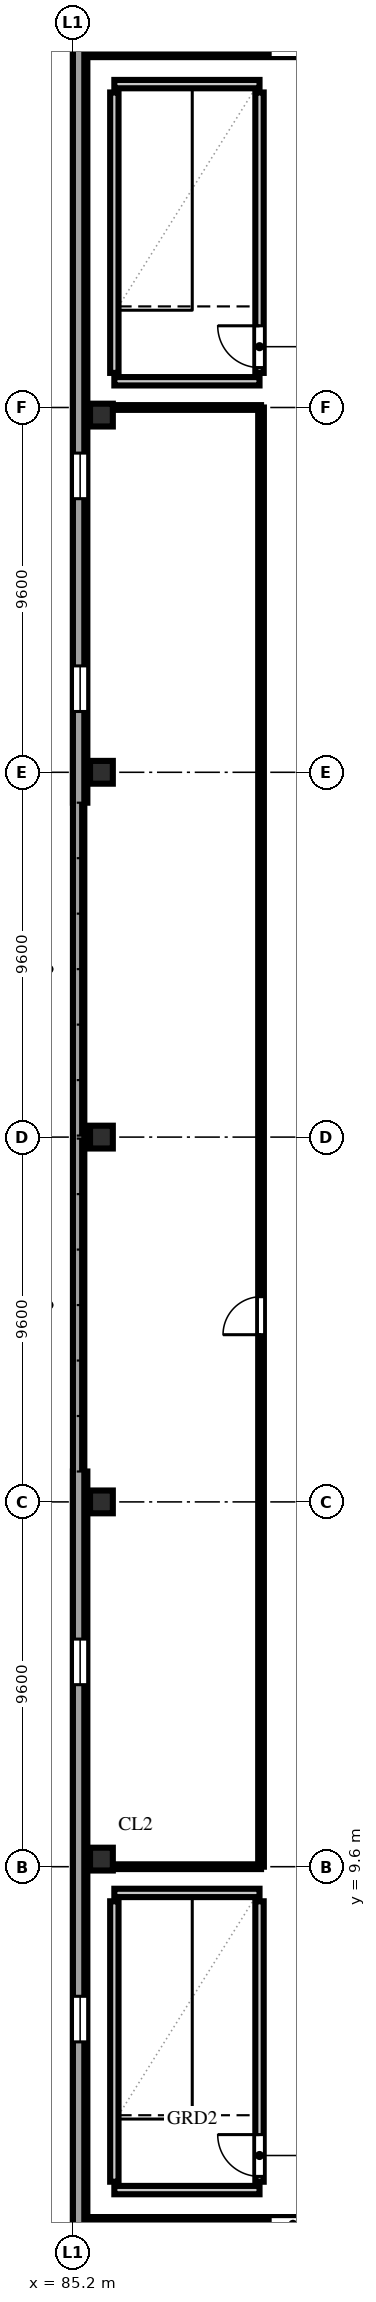
"""IFC4 building model, lengths in metres.
Left out: names, types, materials, properties, quantities, classifications, styles, units other than length and angle.
Written with IfcOpenShell. Run it as: python <this file> out.ifc"""

import sys

from ifc_helpers import new_model, si_unit, direction, frame, frame_2d, origin, origin_2d, place, context, subcontext, project, spatial, rectangle, extrude, element, fill, save


model = new_model("IFC4")
c1 = context("Model", 3, precision=1e-05, world=origin(), true_north=direction((0.0, 1.0)))
c2 = subcontext(c1, "Body", "Model", "MODEL_VIEW")
j1 = project(units=[si_unit("LENGTHUNIT", "METRE"), si_unit("PLANEANGLEUNIT", "RADIAN")], contexts=[c1])
p1 = place(None, origin())
s1 = spatial("IfcSite", under=j1, at=p1, CompositionType="ELEMENT")
p2 = place(p1, origin())
s2 = spatial("IfcBuilding", under=s1, at=p2, CompositionType="ELEMENT")
p3 = place(p2, frame((0.0, 0.0, 19.6)))
s3 = spatial("IfcBuildingStorey", under=s2, at=p3, CompositionType="ELEMENT", Elevation=19.6)
for number, where, z_axis, x_axis in (
    (1, (85.95, 9.8, 0.0), (0.0, 0.0, 1.0), (1.0, 0.0, 0.0)),
    (2, (85.95, 19.2, 0.0), (0.0, 0.0, 1.0), (1.0, 0.0, 0.0)),
    (3, (85.95, 28.8, 0.0), (0.0, 0.0, 1.0), (1.0, 0.0, 0.0)),
    (4, (85.95, 38.4, 0.0), (0.0, 0.0, 1.0), (1.0, 0.0, 0.0)),
    (5, (85.95, 47.8, 0.0), (0.0, 0.0, 1.0), (1.0, 0.0, 0.0)),
):
    element("IfcColumn", number, at=place(p3, frame(where, z_axis=z_axis, x_axis=x_axis)), inside=s3, PredefinedType="COLUMN", context=c2, shape_type="SweptSolid", body=[
        extrude(rectangle(XDim=0.6, YDim=0.6, at=origin_2d()), origin(), (0.0, 0.0, 1.0), 4.32),
    ])
p4 = place(p3, frame((85.39, 0.19, 0.0), z_axis=(0.0, 0.0, 1.0), x_axis=(1.0, 0.0, 0.0)))
e6 = element("IfcWall", 6, at=p4, inside=s3, PredefinedType="SOLIDWALL", context=c2, shape_type="SweptSolid", body=[
    extrude(rectangle(XDim=41.62, YDim=0.38, at=frame_2d((20.81, 0.0))), origin(), (0.0, 0.0, 1.0), 4.32),
])
p5 = place(p4, frame((5.0, 0.0, 1.25)))
e7 = element("IfcOpeningElement", 7, at=p5, cuts=e6, PredefinedType="OPENING", context=c2, shape_type="SweptSolid", body=[
    extrude(rectangle(XDim=1.2, YDim=1.65, at=frame_2d((0.6, 0.825))), frame((0.0, 0.202, 0.0), z_axis=(0.0, -1.0, 0.0), x_axis=(1.0, 0.0, 0.0)), (0.0, 0.0, 1.0), 0.404),
])
p6 = place(p4, frame((11.8, 0.0, 1.25)))
e8 = element("IfcOpeningElement", 8, at=p6, cuts=e6, PredefinedType="OPENING", context=c2, shape_type="SweptSolid", body=[
    extrude(rectangle(XDim=1.2, YDim=1.65, at=frame_2d((0.6, 0.825))), frame((0.0, 0.202, 0.0), z_axis=(0.0, -1.0, 0.0), x_axis=(1.0, 0.0, 0.0)), (0.0, 0.0, 1.0), 0.404),
])
p7 = place(p4, frame((20.2, 0.0, 1.25)))
e9 = element("IfcOpeningElement", 9, at=p7, cuts=e6, PredefinedType="OPENING", context=c2, shape_type="SweptSolid", body=[
    extrude(rectangle(XDim=1.2, YDim=1.65, at=frame_2d((0.6, 0.825))), frame((0.0, 0.202, 0.0), z_axis=(0.0, -1.0, 0.0), x_axis=(1.0, 0.0, 0.0)), (0.0, 0.0, 1.0), 0.404),
])
p8 = place(p4, frame((26.8, 0.0, 1.25)))
e10 = element("IfcOpeningElement", 10, at=p8, cuts=e6, PredefinedType="OPENING", context=c2, shape_type="SweptSolid", body=[
    extrude(rectangle(XDim=1.2, YDim=1.65, at=frame_2d((0.6, 0.825))), frame((0.0, 0.202, 0.0), z_axis=(0.0, -1.0, 0.0), x_axis=(1.0, 0.0, 0.0)), (0.0, 0.0, 1.0), 0.404),
])
p9 = place(p4, frame((36.8, 0.0, 1.25)))
e11 = element("IfcOpeningElement", 11, at=p9, cuts=e6, PredefinedType="OPENING", context=c2, shape_type="SweptSolid", body=[
    extrude(rectangle(XDim=1.2, YDim=1.65, at=frame_2d((0.6, 0.825))), frame((0.0, 0.202, 0.0), z_axis=(0.0, -1.0, 0.0), x_axis=(1.0, 0.0, 0.0)), (0.0, 0.0, 1.0), 0.404),
])
p10 = place(p3, frame((85.39, 57.41, 0.0), z_axis=(0.0, 0.0, 1.0), x_axis=(1.0, 0.0, 0.0)))
e12 = element("IfcWall", 12, at=p10, inside=s3, PredefinedType="SOLIDWALL", context=c2, shape_type="SweptSolid", body=[
    extrude(rectangle(XDim=41.62, YDim=0.38, at=frame_2d((20.81, 0.0))), origin(), (0.0, 0.0, 1.0), 4.32),
])
p11 = place(p10, frame((5.0, 0.0, 1.25)))
e13 = element("IfcOpeningElement", 13, at=p11, cuts=e12, PredefinedType="OPENING", context=c2, shape_type="SweptSolid", body=[
    extrude(rectangle(XDim=1.2, YDim=1.65, at=frame_2d((0.6, 0.825))), frame((0.0, 0.202, 0.0), z_axis=(0.0, -1.0, 0.0), x_axis=(1.0, 0.0, 0.0)), (0.0, 0.0, 1.0), 0.404),
])
p12 = place(p10, frame((11.8, 0.0, 1.25)))
e14 = element("IfcOpeningElement", 14, at=p12, cuts=e12, PredefinedType="OPENING", context=c2, shape_type="SweptSolid", body=[
    extrude(rectangle(XDim=1.2, YDim=1.65, at=frame_2d((0.6, 0.825))), frame((0.0, 0.202, 0.0), z_axis=(0.0, -1.0, 0.0), x_axis=(1.0, 0.0, 0.0)), (0.0, 0.0, 1.0), 0.404),
])
p13 = place(p10, frame((20.2, 0.0, 1.25)))
e15 = element("IfcOpeningElement", 15, at=p13, cuts=e12, PredefinedType="OPENING", context=c2, shape_type="SweptSolid", body=[
    extrude(rectangle(XDim=1.2, YDim=1.65, at=frame_2d((0.6, 0.825))), frame((0.0, 0.202, 0.0), z_axis=(0.0, -1.0, 0.0), x_axis=(1.0, 0.0, 0.0)), (0.0, 0.0, 1.0), 0.404),
])
p14 = place(p10, frame((26.8, 0.0, 1.25)))
e16 = element("IfcOpeningElement", 16, at=p14, cuts=e12, PredefinedType="OPENING", context=c2, shape_type="SweptSolid", body=[
    extrude(rectangle(XDim=1.2, YDim=1.65, at=frame_2d((0.6, 0.825))), frame((0.0, 0.202, 0.0), z_axis=(0.0, -1.0, 0.0), x_axis=(1.0, 0.0, 0.0)), (0.0, 0.0, 1.0), 0.404),
])
p15 = place(p10, frame((36.8, 0.0, 1.25)))
e17 = element("IfcOpeningElement", 17, at=p15, cuts=e12, PredefinedType="OPENING", context=c2, shape_type="SweptSolid", body=[
    extrude(rectangle(XDim=1.2, YDim=1.65, at=frame_2d((0.6, 0.825))), frame((0.0, 0.202, 0.0), z_axis=(0.0, -1.0, 0.0), x_axis=(1.0, 0.0, 0.0)), (0.0, 0.0, 1.0), 0.404),
])
p16 = place(p3, frame((85.39, 0.19, 0.0), z_axis=(0.0, 0.0, 1.0), x_axis=(0.0, 1.0, 0.0)))
e18 = element("IfcWall", 18, at=p16, inside=s3, PredefinedType="SOLIDWALL", context=c2, shape_type="SweptSolid", body=[
    extrude(rectangle(XDim=19.81, YDim=0.38, at=frame_2d((9.905, 0.0))), origin(), (0.0, 0.0, 1.0), 4.32),
])
p17 = place(p16, frame((4.8, 0.0, 1.25)))
e19 = element("IfcOpeningElement", 19, at=p17, cuts=e18, PredefinedType="OPENING", context=c2, shape_type="SweptSolid", body=[
    extrude(rectangle(XDim=1.2, YDim=1.65, at=frame_2d((0.6, 0.825))), frame((0.0, 0.202, 0.0), z_axis=(0.0, -1.0, 0.0), x_axis=(1.0, 0.0, 0.0)), (0.0, 0.0, 1.0), 0.404),
])
p18 = place(p16, frame((14.2, 0.0, 1.25)))
e20 = element("IfcOpeningElement", 20, at=p18, cuts=e18, PredefinedType="OPENING", context=c2, shape_type="SweptSolid", body=[
    extrude(rectangle(XDim=1.2, YDim=1.65, at=frame_2d((0.6, 0.825))), frame((0.0, 0.202, 0.0), z_axis=(0.0, -1.0, 0.0), x_axis=(1.0, 0.0, 0.0)), (0.0, 0.0, 1.0), 0.404),
])
p19 = place(p3, frame((85.39, 37.6, 0.0), z_axis=(0.0, 0.0, 1.0), x_axis=(0.0, 1.0, 0.0)))
e21 = element("IfcWall", 21, at=p19, inside=s3, PredefinedType="SOLIDWALL", context=c2, shape_type="SweptSolid", body=[
    extrude(rectangle(XDim=19.81, YDim=0.38, at=frame_2d((9.905, 0.0))), origin(), (0.0, 0.0, 1.0), 4.32),
])
p20 = place(p19, frame((2.4, 0.0, 1.25)))
e22 = element("IfcOpeningElement", 22, at=p20, cuts=e21, PredefinedType="OPENING", context=c2, shape_type="SweptSolid", body=[
    extrude(rectangle(XDim=1.2, YDim=1.65, at=frame_2d((0.6, 0.825))), frame((0.0, 0.202, 0.0), z_axis=(0.0, -1.0, 0.0), x_axis=(1.0, 0.0, 0.0)), (0.0, 0.0, 1.0), 0.404),
])
p21 = place(p19, frame((8.0, 0.0, 1.25)))
e23 = element("IfcOpeningElement", 23, at=p21, cuts=e21, PredefinedType="OPENING", context=c2, shape_type="SweptSolid", body=[
    extrude(rectangle(XDim=1.2, YDim=1.65, at=frame_2d((0.6, 0.825))), frame((0.0, 0.202, 0.0), z_axis=(0.0, -1.0, 0.0), x_axis=(1.0, 0.0, 0.0)), (0.0, 0.0, 1.0), 0.404),
])
for number, where, z_axis, x_axis in (
    (24, (85.35, 0.15, 4.6), (0.0, 0.0, 1.0), (1.0, 0.0, 0.0)),
    (25, (127.05, 57.45, 4.6), (0.0, 0.0, 1.0), (-1.0, 0.0, 0.0)),
):
    element("IfcWall", number, at=place(p3, frame(where, z_axis=z_axis, x_axis=x_axis)), inside=s3, PredefinedType="PARAPET", context=c2, shape_type="SweptSolid", body=[
        extrude(rectangle(XDim=41.7, YDim=0.3, at=frame_2d((20.85, 0.0))), origin(), (0.0, 0.0, 1.0), 1.15),
    ])
p22 = place(p3, frame((85.35, 57.45, 4.6), z_axis=(0.0, 0.0, 1.0), x_axis=(0.0, -1.0, 0.0)))
e26 = element("IfcWall", 26, at=p22, inside=s3, PredefinedType="PARAPET", context=c2, shape_type="SweptSolid", body=[
    extrude(rectangle(XDim=57.3, YDim=0.3, at=frame_2d((28.65, 0.0))), origin(), (0.0, 0.0, 1.0), 1.15),
])
p23 = place(p3, frame((86.29, 1.31, 0.0), z_axis=(0.0, 0.0, 1.0), x_axis=(0.0, 1.0, 0.0)))
e27 = element("IfcWall", 27, at=p23, inside=s3, PredefinedType="SOLIDWALL", context=c2, shape_type="SweptSolid", body=[
    extrude(rectangle(XDim=7.38, YDim=0.22, at=frame_2d((3.69, 0.0))), origin(), (0.0, 0.0, 1.0), 4.32),
])
for number, where, z_axis, x_axis in (
    (28, (86.29, 1.09, 0.0), (0.0, 0.0, 1.0), (1.0, 0.0, 0.0)),
    (29, (86.29, 8.91, 0.0), (0.0, 0.0, 1.0), (1.0, 0.0, 0.0)),
):
    element("IfcWall", number, at=place(p3, frame(where, z_axis=z_axis, x_axis=x_axis)), inside=s3, PredefinedType="SOLIDWALL", context=c2, shape_type="SweptSolid", body=[
        extrude(rectangle(XDim=3.82, YDim=0.22, at=frame_2d((1.91, 0.0))), origin(), (0.0, 0.0, 1.0), 4.32),
    ])
p24 = place(p3, frame((90.11, 1.31, 0.0), z_axis=(0.0, 0.0, 1.0), x_axis=(0.0, 1.0, 0.0)))
e30 = element("IfcWall", 30, at=p24, inside=s3, PredefinedType="SOLIDWALL", context=c2, shape_type="SweptSolid", body=[
    extrude(rectangle(XDim=7.38, YDim=0.22, at=frame_2d((3.69, 0.0))), origin(), (0.0, 0.0, 1.0), 4.32),
])
p25 = place(p24, frame((0.14, 0.0, 0.0)))
e31 = element("IfcOpeningElement", 31, at=p25, cuts=e30, PredefinedType="OPENING", context=c2, shape_type="SweptSolid", body=[
    extrude(rectangle(XDim=1.1, YDim=2.2, at=frame_2d((0.55, 1.1))), frame((0.0, 0.122, 0.0), z_axis=(0.0, -1.0, 0.0), x_axis=(1.0, 0.0, 0.0)), (0.0, 0.0, 1.0), 0.244),
])
p26 = place(p3, frame((86.29, 48.91, 0.0), z_axis=(0.0, 0.0, 1.0), x_axis=(0.0, 1.0, 0.0)))
e32 = element("IfcWall", 32, at=p26, inside=s3, PredefinedType="SOLIDWALL", context=c2, shape_type="SweptSolid", body=[
    extrude(rectangle(XDim=7.38, YDim=0.22, at=frame_2d((3.69, 0.0))), origin(), (0.0, 0.0, 1.0), 4.32),
])
for number, where, z_axis, x_axis in (
    (33, (86.29, 48.69, 0.0), (0.0, 0.0, 1.0), (1.0, 0.0, 0.0)),
    (34, (86.29, 56.51, 0.0), (0.0, 0.0, 1.0), (1.0, 0.0, 0.0)),
):
    element("IfcWall", number, at=place(p3, frame(where, z_axis=z_axis, x_axis=x_axis)), inside=s3, PredefinedType="SOLIDWALL", context=c2, shape_type="SweptSolid", body=[
        extrude(rectangle(XDim=3.82, YDim=0.22, at=frame_2d((1.91, 0.0))), origin(), (0.0, 0.0, 1.0), 4.32),
    ])
p27 = place(p3, frame((90.11, 48.91, 0.0), z_axis=(0.0, 0.0, 1.0), x_axis=(0.0, 1.0, 0.0)))
e35 = element("IfcWall", 35, at=p27, inside=s3, PredefinedType="SOLIDWALL", context=c2, shape_type="SweptSolid", body=[
    extrude(rectangle(XDim=7.38, YDim=0.22, at=frame_2d((3.69, 0.0))), origin(), (0.0, 0.0, 1.0), 4.32),
])
p28 = place(p27, frame((0.14, 0.0, 0.0)))
e36 = element("IfcOpeningElement", 36, at=p28, cuts=e35, PredefinedType="OPENING", context=c2, shape_type="SweptSolid", body=[
    extrude(rectangle(XDim=1.1, YDim=2.2, at=frame_2d((0.55, 1.1))), frame((0.0, 0.122, 0.0), z_axis=(0.0, -1.0, 0.0), x_axis=(1.0, 0.0, 0.0)), (0.0, 0.0, 1.0), 0.244),
])
p29 = place(p3, frame((85.55, 9.6, 0.0), z_axis=(0.0, 0.0, 1.0), x_axis=(1.0, 0.0, 0.0)))
e37 = element("IfcWall", 37, at=p29, inside=s3, PredefinedType="PARTITIONING", context=c2, shape_type="SweptSolid", body=[
    extrude(rectangle(XDim=0.4, YDim=0.125, at=frame_2d((0.2, 0.0))), origin(), (0.0, 0.0, 1.0), 4.32),
])
p30 = place(p3, frame((85.95, 9.6, 0.0), z_axis=(0.0, 0.0, 1.0), x_axis=(1.0, 0.0, 0.0)))
e38 = element("IfcWall", 38, at=p30, inside=s3, PredefinedType="PARTITIONING", context=c2, shape_type="SweptSolid", body=[
    extrude(rectangle(XDim=4.2, YDim=0.125, at=frame_2d((2.1, 0.0))), origin(), (0.0, 0.0, 1.0), 3.52),
])
p31 = place(p3, frame((85.55, 48.0, 0.0), z_axis=(0.0, 0.0, 1.0), x_axis=(1.0, 0.0, 0.0)))
e39 = element("IfcWall", 39, at=p31, inside=s3, PredefinedType="PARTITIONING", context=c2, shape_type="SweptSolid", body=[
    extrude(rectangle(XDim=0.4, YDim=0.125, at=frame_2d((0.2, 0.0))), origin(), (0.0, 0.0, 1.0), 4.32),
])
p32 = place(p3, frame((85.95, 48.0, 0.0), z_axis=(0.0, 0.0, 1.0), x_axis=(1.0, 0.0, 0.0)))
e40 = element("IfcWall", 40, at=p32, inside=s3, PredefinedType="PARTITIONING", context=c2, shape_type="SweptSolid", body=[
    extrude(rectangle(XDim=4.2, YDim=0.125, at=frame_2d((2.1, 0.0))), origin(), (0.0, 0.0, 1.0), 3.52),
])
p33 = place(p3, frame((90.15, 9.6, 0.0), z_axis=(0.0, 0.0, 1.0), x_axis=(0.0, 1.0, 0.0)))
e41 = element("IfcWall", 41, at=p33, inside=s3, PredefinedType="PARTITIONING", context=c2, shape_type="SweptSolid", body=[
    extrude(rectangle(XDim=38.4, YDim=0.15, at=frame_2d((19.2, 0.0))), origin(), (0.0, 0.0, 1.0), 4.32),
])
p34 = place(p33, frame((14.0, 0.0, 0.0)))
e42 = element("IfcOpeningElement", 42, at=p34, cuts=e41, PredefinedType="OPENING", context=c2, shape_type="SweptSolid", body=[
    extrude(rectangle(XDim=1.0, YDim=2.2, at=frame_2d((0.5, 1.1))), frame((0.0, 0.087, 0.0), z_axis=(0.0, -1.0, 0.0), x_axis=(1.0, 0.0, 0.0)), (0.0, 0.0, 1.0), 0.174),
])
p35 = place(p5, origin())
e43 = element("IfcWindow", 43, at=p35, inside=s3, PartitioningType="SINGLE_PANEL", PredefinedType="WINDOW", context=c2, shape_type="SweptSolid", body=[
    extrude(rectangle(XDim=1.2, YDim=1.65, at=frame_2d((0.6, 0.825))), frame((0.0, 0.11, 0.0), z_axis=(0.0, -1.0, 0.0), x_axis=(1.0, 0.0, 0.0)), (0.0, 0.0, 1.0), 0.06),
])
fill(e7, e43)
p36 = place(p17, origin())
e44 = element("IfcWindow", 44, at=p36, inside=s3, PartitioningType="SINGLE_PANEL", PredefinedType="WINDOW", context=c2, shape_type="SweptSolid", body=[
    extrude(rectangle(XDim=1.2, YDim=1.65, at=frame_2d((0.6, 0.825))), frame((0.0, 0.11, 0.0), z_axis=(0.0, -1.0, 0.0), x_axis=(1.0, 0.0, 0.0)), (0.0, 0.0, 1.0), 0.06),
])
fill(e19, e44)
p37 = place(p18, origin())
e45 = element("IfcWindow", 45, at=p37, inside=s3, PartitioningType="SINGLE_PANEL", PredefinedType="WINDOW", context=c2, shape_type="SweptSolid", body=[
    extrude(rectangle(XDim=1.2, YDim=1.65, at=frame_2d((0.6, 0.825))), frame((0.0, 0.11, 0.0), z_axis=(0.0, -1.0, 0.0), x_axis=(1.0, 0.0, 0.0)), (0.0, 0.0, 1.0), 0.06),
])
fill(e20, e45)
p38 = place(p20, origin())
e46 = element("IfcWindow", 46, at=p38, inside=s3, PartitioningType="SINGLE_PANEL", PredefinedType="WINDOW", context=c2, shape_type="SweptSolid", body=[
    extrude(rectangle(XDim=1.2, YDim=1.65, at=frame_2d((0.6, 0.825))), frame((0.0, 0.11, 0.0), z_axis=(0.0, -1.0, 0.0), x_axis=(1.0, 0.0, 0.0)), (0.0, 0.0, 1.0), 0.06),
])
fill(e22, e46)
p39 = place(p21, origin())
e47 = element("IfcWindow", 47, at=p39, inside=s3, PartitioningType="SINGLE_PANEL", PredefinedType="WINDOW", context=c2, shape_type="SweptSolid", body=[
    extrude(rectangle(XDim=1.2, YDim=1.65, at=frame_2d((0.6, 0.825))), frame((0.0, 0.11, 0.0), z_axis=(0.0, -1.0, 0.0), x_axis=(1.0, 0.0, 0.0)), (0.0, 0.0, 1.0), 0.06),
])
fill(e23, e47)
p40 = place(p25, origin())
e48 = element("IfcDoor", 48, at=p40, inside=s3, OperationType="SINGLE_SWING_RIGHT", PredefinedType="DOOR", context=c2, shape_type="SweptSolid", body=[
    extrude(rectangle(XDim=1.1, YDim=2.2, at=frame_2d((0.55, 1.1))), frame((0.0, 0.025, 0.0), z_axis=(0.0, -1.0, 0.0), x_axis=(1.0, 0.0, 0.0)), (0.0, 0.0, 1.0), 0.05),
])
fill(e31, e48)
p41 = place(p28, origin())
e49 = element("IfcDoor", 49, at=p41, inside=s3, OperationType="SINGLE_SWING_RIGHT", PredefinedType="DOOR", context=c2, shape_type="SweptSolid", body=[
    extrude(rectangle(XDim=1.1, YDim=2.2, at=frame_2d((0.55, 1.1))), frame((0.0, 0.025, 0.0), z_axis=(0.0, -1.0, 0.0), x_axis=(1.0, 0.0, 0.0)), (0.0, 0.0, 1.0), 0.05),
])
fill(e36, e49)
p42 = place(p34, origin())
e50 = element("IfcDoor", 50, at=p42, inside=s3, OperationType="SINGLE_SWING_LEFT", PredefinedType="DOOR", context=c2, shape_type="SweptSolid", body=[
    extrude(rectangle(XDim=1.0, YDim=2.2, at=frame_2d((0.5, 1.1))), frame((0.0, 0.025, 0.0), z_axis=(0.0, -1.0, 0.0), x_axis=(1.0, 0.0, 0.0)), (0.0, 0.0, 1.0), 0.05),
])
fill(e42, e50)
save(model, sys.argv[1])
